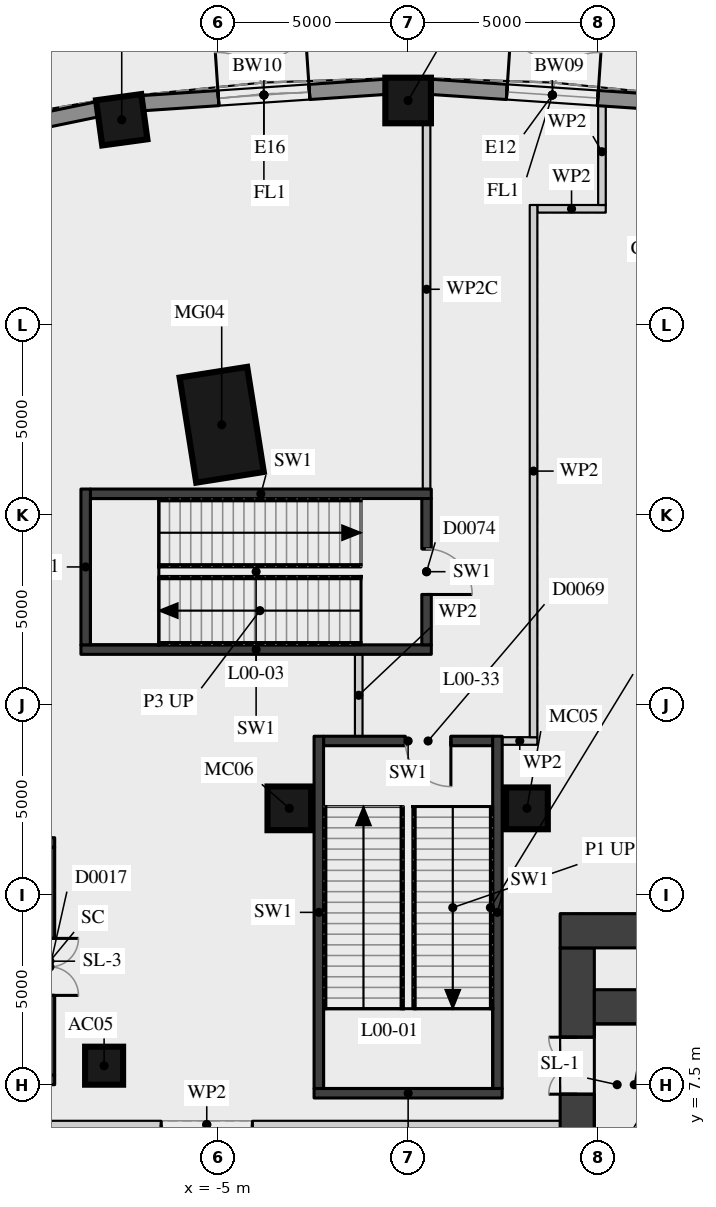
"""IFC4 building model, lengths in metres.
Left out: names, types, materials, properties, quantities, classifications, styles, units other than length and angle.
Written with IfcOpenShell. Run it as: python <this file> out.ifc"""

import sys

from ifc_helpers import new_model, si_unit, direction, frame, frame_2d, origin, origin_2d, place, context, subcontext, project, spatial, rectangle, extrude, element, fill, save


model = new_model("IFC4")
c1 = context("Model", 3, precision=1e-05, world=origin(), true_north=direction((0.0, 1.0)))
c2 = subcontext(c1, "Body", "Model", "MODEL_VIEW")
j1 = project(units=[si_unit("LENGTHUNIT", "METRE"), si_unit("PLANEANGLEUNIT", "RADIAN")], contexts=[c1])
p1 = place(None, origin())
s1 = spatial("IfcSite", under=j1, at=p1, CompositionType="ELEMENT")
p2 = place(p1, origin())
s2 = spatial("IfcBuilding", under=s1, at=p2, CompositionType="ELEMENT")
p3 = place(p2, origin())
s3 = spatial("IfcBuildingStorey", under=s2, at=p3, CompositionType="ELEMENT", Elevation=0.0)
p4 = place(p3, frame((-4.906, 24.866, 0.0), z_axis=(0.0, 0.0, 1.0), x_axis=(-0.15614709407, 0.987733812833, 0.0)))
e1 = element("IfcColumn", 1, at=p4, inside=s3, PredefinedType="COLUMN", context=c2, shape_type="SweptSolid", body=[
    extrude(rectangle(XDim=2.8, YDim=1.8, at=origin_2d()), origin(), (0.0, 0.0, 1.0), 7.5),
])
p5 = place(p3, frame((-8.0, 8.0, 0.0), z_axis=(0.0, 0.0, 1.0), x_axis=(1.0, 0.0, 0.0)))
e2 = element("IfcColumn", 2, at=p5, inside=s3, PredefinedType="COLUMN", context=c2, shape_type="SweptSolid", body=[
    extrude(rectangle(XDim=1.0, YDim=1.0, at=origin_2d()), origin(), (0.0, 0.0, 1.0), 7.5),
])
p6 = place(p3, frame((3.126, 14.772, 0.0), z_axis=(0.0, 0.0, 1.0), x_axis=(1.0, 0.0, 0.0)))
e3 = element("IfcColumn", 3, at=p6, inside=s3, PredefinedType="COLUMN", context=c2, shape_type="SweptSolid", body=[
    extrude(rectangle(XDim=1.1, YDim=1.1, at=origin_2d()), origin(), (0.0, 0.0, 1.0), 7.5),
])
p7 = place(p3, frame((-3.126, 14.772, 0.0), z_axis=(0.0, 0.0, 1.0), x_axis=(1.0, 0.0, 0.0)))
e4 = element("IfcColumn", 4, at=p7, inside=s3, PredefinedType="COLUMN", context=c2, shape_type="SweptSolid", body=[
    extrude(rectangle(XDim=1.15, YDim=1.15, at=origin_2d()), origin(), (0.0, 0.0, 1.0), 7.5),
])
for number, where, z_axis, x_axis in (
    (5, (0.0, 33.4, 0.0), (0.0, 0.0, 1.0), (0.0, 1.0, 0.0)),
    (6, (-7.536, 32.893, 0.0), (0.0, 0.0, 1.0), (-0.135, 0.991, 0.0)),
):
    element("IfcColumn", number, at=place(p3, frame(where, z_axis=z_axis, x_axis=x_axis)), inside=s3, PredefinedType="COLUMN", context=c2, shape_type="SweptSolid", body=[
        extrude(rectangle(XDim=1.2, YDim=1.2, at=origin_2d()), origin(), (0.0, 0.0, 1.0), 7.5),
    ])
p8 = place(p3, frame((7.02, 33.327, 0.0), z_axis=(0.0, 0.0, 1.0), x_axis=(-0.997740655275, 0.067183218234, 0.0)))
e7 = element("IfcWall", 7, at=p8, inside=s3, PredefinedType="SOLIDWALL", context=c2, shape_type="SweptSolid", body=[
    extrude(rectangle(XDim=6.465, YDim=0.4, at=frame_2d((3.232, 0.0))), origin(), (0.0, 0.0, 1.0), 6.19),
])
p9 = place(p8, frame((2.032, 0.0, 0.0)))
e8 = element("IfcOpeningElement", 8, at=p9, cuts=e7, PredefinedType="OPENING", context=c2, shape_type="SweptSolid", body=[
    extrude(rectangle(XDim=2.4, YDim=2.2, at=frame_2d((1.2, 1.1))), frame((0.0, 0.21, 0.0), z_axis=(0.0, -1.0, 0.0), x_axis=(1.0, 0.0, 0.0)), (0.0, 0.0, 1.0), 0.42),
])
p10 = place(p8, frame((2.032, 0.0, 2.6)))
e9 = element("IfcOpeningElement", 9, at=p10, cuts=e7, PredefinedType="OPENING", context=c2, shape_type="SweptSolid", body=[
    extrude(rectangle(XDim=2.4, YDim=3.49, at=frame_2d((1.2, 1.745))), frame((0.0, 0.21, 0.0), z_axis=(0.0, -1.0, 0.0), x_axis=(1.0, 0.0, 0.0)), (0.0, 0.0, 1.0), 0.42),
])
p11 = place(p3, frame((-0.57, 33.761, 0.0), z_axis=(0.0, 0.0, 1.0), x_axis=(-0.997740655275, -0.067183218234, 0.0)))
e10 = element("IfcWall", 10, at=p11, inside=s3, PredefinedType="SOLIDWALL", context=c2, shape_type="SweptSolid", body=[
    extrude(rectangle(XDim=6.465, YDim=0.4, at=frame_2d((3.232, 0.0))), origin(), (0.0, 0.0, 1.0), 6.19),
])
p12 = place(p11, frame((2.032, 0.0, 0.0)))
e11 = element("IfcOpeningElement", 11, at=p12, cuts=e10, PredefinedType="OPENING", context=c2, shape_type="SweptSolid", body=[
    extrude(rectangle(XDim=2.4, YDim=2.2, at=frame_2d((1.2, 1.1))), frame((0.0, 0.21, 0.0), z_axis=(0.0, -1.0, 0.0), x_axis=(1.0, 0.0, 0.0)), (0.0, 0.0, 1.0), 0.42),
])
p13 = place(p11, frame((2.032, 0.0, 2.6)))
e12 = element("IfcOpeningElement", 12, at=p13, cuts=e10, PredefinedType="OPENING", context=c2, shape_type="SweptSolid", body=[
    extrude(rectangle(XDim=2.4, YDim=3.49, at=frame_2d((1.2, 1.745))), frame((0.0, 0.21, 0.0), z_axis=(0.0, -1.0, 0.0), x_axis=(1.0, 0.0, 0.0)), (0.0, 0.0, 1.0), 0.42),
])
p14 = place(p3, frame((-8.15, 33.173, 0.0), z_axis=(0.0, 0.0, 1.0), x_axis=(-0.979388896242, -0.201983637746, 0.0)))
e13 = element("IfcWall", 13, at=p14, inside=s3, PredefinedType="SOLIDWALL", context=c2, shape_type="SweptSolid", body=[
    extrude(rectangle(XDim=6.374, YDim=0.4, at=frame_2d((3.187, 0.0))), origin(), (0.0, 0.0, 1.0), 6.19),
])
p15 = place(p14, frame((1.987, 0.0, 0.0)))
e14 = element("IfcOpeningElement", 14, at=p15, cuts=e13, PredefinedType="OPENING", context=c2, shape_type="SweptSolid", body=[
    extrude(rectangle(XDim=2.4, YDim=2.2, at=frame_2d((1.2, 1.1))), frame((0.0, 0.21, 0.0), z_axis=(0.0, -1.0, 0.0), x_axis=(1.0, 0.0, 0.0)), (0.0, 0.0, 1.0), 0.42),
])
p16 = place(p14, frame((1.987, 0.0, 2.6)))
e15 = element("IfcOpeningElement", 15, at=p16, cuts=e13, PredefinedType="OPENING", context=c2, shape_type="SweptSolid", body=[
    extrude(rectangle(XDim=2.4, YDim=3.49, at=frame_2d((1.2, 1.745))), frame((0.0, 0.21, 0.0), z_axis=(0.0, -1.0, 0.0), x_axis=(1.0, 0.0, 0.0)), (0.0, 0.0, 1.0), 0.42),
])
p17 = place(p3, frame((4.45, -11.1, 0.0), z_axis=(0.0, 0.0, 1.0), x_axis=(0.0, 1.0, 0.0)))
e16 = element("IfcWall", 16, at=p17, inside=s3, PredefinedType="SHEAR", context=c2, shape_type="SweptSolid", body=[
    extrude(rectangle(XDim=22.2, YDim=0.9, at=frame_2d((11.1, 0.0))), origin(), (0.0, 0.0, 1.0), 7.09),
])
p18 = place(p17, frame((2.35, 0.0, 0.0)))
e17 = element("IfcOpeningElement", 17, at=p18, cuts=e16, PredefinedType="OPENING", context=c2, shape_type="SweptSolid", body=[
    extrude(rectangle(XDim=1.5, YDim=2.1, at=frame_2d((0.75, 1.05))), frame((0.0, 0.46, 0.0), z_axis=(0.0, -1.0, 0.0), x_axis=(1.0, 0.0, 0.0)), (0.0, 0.0, 1.0), 0.92),
])
p19 = place(p17, frame((5.45, 0.0, 0.0)))
e18 = element("IfcOpeningElement", 18, at=p19, cuts=e16, PredefinedType="OPENING", context=c2, shape_type="SweptSolid", body=[
    extrude(rectangle(XDim=1.8, YDim=2.1, at=frame_2d((0.9, 1.05))), frame((0.0, 0.46, 0.0), z_axis=(0.0, -1.0, 0.0), x_axis=(1.0, 0.0, 0.0)), (0.0, 0.0, 1.0), 0.92),
])
p20 = place(p17, frame((7.95, 0.0, 0.0)))
e19 = element("IfcOpeningElement", 19, at=p20, cuts=e16, PredefinedType="OPENING", context=c2, shape_type="SweptSolid", body=[
    extrude(rectangle(XDim=1.1, YDim=2.1, at=frame_2d((0.55, 1.05))), frame((0.0, 0.46, 0.0), z_axis=(0.0, -1.0, 0.0), x_axis=(1.0, 0.0, 0.0)), (0.0, 0.0, 1.0), 0.92),
])
p21 = place(p17, frame((10.6, 0.0, 0.0)))
e20 = element("IfcOpeningElement", 20, at=p21, cuts=e16, PredefinedType="OPENING", context=c2, shape_type="SweptSolid", body=[
    extrude(rectangle(XDim=1.0, YDim=2.1, at=frame_2d((0.5, 1.05))), frame((0.0, 0.46, 0.0), z_axis=(0.0, -1.0, 0.0), x_axis=(1.0, 0.0, 0.0)), (0.0, 0.0, 1.0), 0.92),
])
p22 = place(p17, frame((13.15, 0.0, 0.0)))
e21 = element("IfcOpeningElement", 21, at=p22, cuts=e16, PredefinedType="OPENING", context=c2, shape_type="SweptSolid", body=[
    extrude(rectangle(XDim=1.1, YDim=2.1, at=frame_2d((0.55, 1.05))), frame((0.0, 0.46, 0.0), z_axis=(0.0, -1.0, 0.0), x_axis=(1.0, 0.0, 0.0)), (0.0, 0.0, 1.0), 0.92),
])
p23 = place(p17, frame((14.95, 0.0, 0.0)))
e22 = element("IfcOpeningElement", 22, at=p23, cuts=e16, PredefinedType="OPENING", context=c2, shape_type="SweptSolid", body=[
    extrude(rectangle(XDim=1.8, YDim=2.1, at=frame_2d((0.9, 1.05))), frame((0.0, 0.46, 0.0), z_axis=(0.0, -1.0, 0.0), x_axis=(1.0, 0.0, 0.0)), (0.0, 0.0, 1.0), 0.92),
])
p24 = place(p17, frame((18.35, 0.0, 0.0)))
e23 = element("IfcOpeningElement", 23, at=p24, cuts=e16, PredefinedType="OPENING", context=c2, shape_type="SweptSolid", body=[
    extrude(rectangle(XDim=1.5, YDim=2.1, at=frame_2d((0.75, 1.05))), frame((0.0, 0.46, 0.0), z_axis=(0.0, -1.0, 0.0), x_axis=(1.0, 0.0, 0.0)), (0.0, 0.0, 1.0), 0.92),
])
p25 = place(p3, frame((4.0, 11.55, 0.0), z_axis=(0.0, 0.0, 1.0), x_axis=(1.0, 0.0, 0.0)))
e24 = element("IfcWall", 24, at=p25, inside=s3, PredefinedType="SHEAR", context=c2, shape_type="SweptSolid", body=[
    extrude(rectangle(XDim=15.2, YDim=0.9, at=frame_2d((7.6, 0.0))), origin(), (0.0, 0.0, 1.0), 7.09),
])
p26 = place(p3, frame((4.9, 9.55, 0.0), z_axis=(0.0, 0.0, 1.0), x_axis=(1.0, 0.0, 0.0)))
e25 = element("IfcWall", 25, at=p26, inside=s3, PredefinedType="SHEAR", context=c2, shape_type="SweptSolid", body=[
    extrude(rectangle(XDim=10.2, YDim=0.9, at=frame_2d((5.1, 0.0))), origin(), (0.0, 0.0, 1.0), 7.09),
])
p27 = place(p3, frame((-9.425, 7.75, 0.0), z_axis=(0.0, 0.0, 1.0), x_axis=(0.0, 1.0, 0.0)))
e26 = element("IfcWall", 26, at=p27, inside=s3, PredefinedType="SHEAR", context=c2, shape_type="SweptSolid", body=[
    extrude(rectangle(XDim=6.0, YDim=0.25, at=frame_2d((3.0, 0.0))), origin(), (0.0, 0.0, 1.0), 7.09),
])
p28 = place(p27, frame((2.1, 0.0, 0.0)))
e27 = element("IfcOpeningElement", 27, at=p28, cuts=e26, PredefinedType="OPENING", context=c2, shape_type="SweptSolid", body=[
    extrude(rectangle(XDim=1.5, YDim=2.1, at=frame_2d((0.75, 1.05))), frame((0.0, 0.135, 0.0), z_axis=(0.0, -1.0, 0.0), x_axis=(1.0, 0.0, 0.0)), (0.0, 0.0, 1.0), 0.27),
])
for number, where, z_axis, x_axis in (
    (28, (-14.5, 13.875, 0.0), (0.0, 0.0, 1.0), (1.0, 0.0, 0.0)),
    (29, (-14.5, 7.625, 0.0), (0.0, 0.0, 1.0), (1.0, 0.0, 0.0)),
):
    element("IfcWall", number, at=place(p3, frame(where, z_axis=z_axis, x_axis=x_axis)), inside=s3, PredefinedType="SHEAR", context=c2, shape_type="SweptSolid", body=[
        extrude(rectangle(XDim=5.2, YDim=0.25, at=frame_2d((2.6, 0.0))), origin(), (0.0, 0.0, 1.0), 7.09),
    ])
p29 = place(p3, frame((-14.6, 6.45, 0.0), z_axis=(0.0, 0.0, 1.0), x_axis=(1.0, 0.0, 0.0)))
e30 = element("IfcWall", 30, at=p29, inside=s3, PredefinedType="PARTITIONING", context=c2, shape_type="SweptSolid", body=[
    extrude(rectangle(XDim=18.602, YDim=0.2, at=frame_2d((9.301, 0.0))), origin(), (0.0, 0.0, 1.0), 7.09),
])
p30 = place(p29, frame((8.101, 0.0, 0.0)))
e31 = element("IfcOpeningElement", 31, at=p30, cuts=e30, PredefinedType="OPENING", context=c2, shape_type="SweptSolid", body=[
    extrude(rectangle(XDim=2.4, YDim=2.4, at=frame_2d((1.2, 1.2))), frame((0.0, 0.11, 0.0), z_axis=(0.0, -1.0, 0.0), x_axis=(1.0, 0.0, 0.0)), (0.0, 0.0, 1.0), 0.22),
])
p31 = place(p3, frame((-2.475, 7.275, 0.0), z_axis=(0.0, 0.0, 1.0), x_axis=(1.0, 0.0, 0.0)))
e32 = element("IfcWall", 32, at=p31, inside=s3, PredefinedType="SOLIDWALL", context=c2, shape_type="SweptSolid", body=[
    extrude(rectangle(XDim=4.95, YDim=0.25, at=frame_2d((2.475, 0.0))), origin(), (0.0, 0.0, 1.0), 7.09),
])
p32 = place(p3, frame((-2.225, 16.545, 0.0), z_axis=(0.0, 0.0, 1.0), x_axis=(1.0, 0.0, 0.0)))
e33 = element("IfcWall", 33, at=p32, inside=s3, PredefinedType="SOLIDWALL", context=c2, shape_type="SweptSolid", body=[
    extrude(rectangle(XDim=4.45, YDim=0.25, at=frame_2d((2.225, 0.0))), origin(), (0.0, 0.0, 1.0), 7.09),
])
p33 = place(p32, frame((2.15, 0.0, 0.0)))
e34 = element("IfcOpeningElement", 34, at=p33, cuts=e33, PredefinedType="OPENING", context=c2, shape_type="SweptSolid", body=[
    extrude(rectangle(XDim=1.2, YDim=2.1, at=frame_2d((0.6, 1.05))), frame((0.0, 0.135, 0.0), z_axis=(0.0, -1.0, 0.0), x_axis=(1.0, 0.0, 0.0)), (0.0, 0.0, 1.0), 0.27),
])
p34 = place(p3, frame((2.475, 16.545, 0.0), z_axis=(0.0, 0.0, 1.0), x_axis=(1.0, 0.0, 0.0)))
e35 = element("IfcWall", 35, at=p34, inside=s3, PredefinedType="PARTITIONING", context=c2, shape_type="SweptSolid", body=[
    extrude(rectangle(XDim=0.925, YDim=0.2, at=frame_2d((0.462, 0.0))), origin(), (0.0, 0.0, 1.0), 7.09),
])
p35 = place(p3, frame((-8.61, 18.95, 0.0), z_axis=(0.0, 0.0, 1.0), x_axis=(1.0, 0.0, 0.0)))
e36 = element("IfcWall", 36, at=p35, inside=s3, PredefinedType="SOLIDWALL", context=c2, shape_type="SweptSolid", body=[
    extrude(rectangle(XDim=9.22, YDim=0.25, at=frame_2d((4.61, 0.0))), origin(), (0.0, 0.0, 1.0), 7.09),
])
p36 = place(p3, frame((-8.36, 23.05, 0.0), z_axis=(0.0, 0.0, 1.0), x_axis=(1.0, 0.0, 0.0)))
e37 = element("IfcWall", 37, at=p36, inside=s3, PredefinedType="SOLIDWALL", context=c2, shape_type="SweptSolid", body=[
    extrude(rectangle(XDim=8.97, YDim=0.25, at=frame_2d((4.485, 0.0))), origin(), (0.0, 0.0, 1.0), 7.09),
])
p37 = place(p3, frame((3.4, 30.55, 0.0), z_axis=(0.0, 0.0, 1.0), x_axis=(1.0, 0.0, 0.0)))
e38 = element("IfcWall", 38, at=p37, inside=s3, PredefinedType="PARTITIONING", context=c2, shape_type="SweptSolid", body=[
    extrude(rectangle(XDim=1.8, YDim=0.2, at=frame_2d((0.9, 0.0))), origin(), (0.0, 0.0, 1.0), 7.09),
])
p38 = place(p3, frame((-8.485, 19.075, 0.0), z_axis=(0.0, 0.0, 1.0), x_axis=(0.0, 1.0, 0.0)))
e39 = element("IfcWall", 39, at=p38, inside=s3, PredefinedType="SOLIDWALL", context=c2, shape_type="SweptSolid", body=[
    extrude(rectangle(XDim=4.1, YDim=0.25, at=frame_2d((2.05, 0.0))), origin(), (0.0, 0.0, 1.0), 7.09),
])
p39 = place(p3, frame((-2.35, 7.4, 0.0), z_axis=(0.0, 0.0, 1.0), x_axis=(0.0, 1.0, 0.0)))
e40 = element("IfcWall", 40, at=p39, inside=s3, PredefinedType="SOLIDWALL", context=c2, shape_type="SweptSolid", body=[
    extrude(rectangle(XDim=9.27, YDim=0.25, at=frame_2d((4.635, 0.0))), origin(), (0.0, 0.0, 1.0), 7.09),
])
p40 = place(p3, frame((-1.3, 16.67, 0.0), z_axis=(0.0, 0.0, 1.0), x_axis=(0.0, 1.0, 0.0)))
e41 = element("IfcWall", 41, at=p40, inside=s3, PredefinedType="PARTITIONING", context=c2, shape_type="SweptSolid", body=[
    extrude(rectangle(XDim=2.155, YDim=0.2, at=frame_2d((1.078, 0.0))), origin(), (0.0, 0.0, 1.0), 7.09),
])
p41 = place(p3, frame((0.485, 19.075, 0.0), z_axis=(0.0, 0.0, 1.0), x_axis=(0.0, 1.0, 0.0)))
e42 = element("IfcWall", 42, at=p41, inside=s3, PredefinedType="SOLIDWALL", context=c2, shape_type="SweptSolid", body=[
    extrude(rectangle(XDim=3.85, YDim=0.25, at=frame_2d((1.925, 0.0))), origin(), (0.0, 0.0, 1.0), 7.09),
])
p42 = place(p41, frame((1.325, 0.0, 0.0)))
e43 = element("IfcOpeningElement", 43, at=p42, cuts=e42, PredefinedType="OPENING", context=c2, shape_type="SweptSolid", body=[
    extrude(rectangle(XDim=1.2, YDim=2.1, at=frame_2d((0.6, 1.05))), frame((0.0, 0.135, 0.0), z_axis=(0.0, -1.0, 0.0), x_axis=(1.0, 0.0, 0.0)), (0.0, 0.0, 1.0), 0.27),
])
p43 = place(p3, frame((0.485, 23.175, 0.0), z_axis=(0.0, 0.0, 1.0), x_axis=(0.0, 1.0, 0.0)))
e44 = element("IfcWall", 44, at=p43, inside=s3, PredefinedType="PARTITIONING", context=c2, shape_type="SweptSolid", body=[
    extrude(rectangle(XDim=10.514, YDim=0.2, at=frame_2d((5.257, 0.0))), origin(), (0.0, 0.0, 1.0), 6.19),
])
p44 = place(p3, frame((2.35, 7.4, 0.0), z_axis=(0.0, 0.0, 1.0), x_axis=(0.0, 1.0, 0.0)))
e45 = element("IfcWall", 45, at=p44, inside=s3, PredefinedType="SOLIDWALL", context=c2, shape_type="SweptSolid", body=[
    extrude(rectangle(XDim=9.27, YDim=0.25, at=frame_2d((4.635, 0.0))), origin(), (0.0, 0.0, 1.0), 7.09),
])
p45 = place(p3, frame((3.3, 16.645, 0.0), z_axis=(0.0, 0.0, 1.0), x_axis=(0.0, 1.0, 0.0)))
e46 = element("IfcWall", 46, at=p45, inside=s3, PredefinedType="PARTITIONING", context=c2, shape_type="SweptSolid", body=[
    extrude(rectangle(XDim=14.005, YDim=0.2, at=frame_2d((7.002, 0.0))), origin(), (0.0, 0.0, 1.0), 7.09),
])
p46 = place(p3, frame((5.1, 30.65, 0.0), z_axis=(0.0, 0.0, 1.0), x_axis=(0.0, 1.0, 0.0)))
e47 = element("IfcWall", 47, at=p46, inside=s3, PredefinedType="PARTITIONING", context=c2, shape_type="SweptSolid", body=[
    extrude(rectangle(XDim=2.803, YDim=0.2, at=frame_2d((1.401, 0.0))), origin(), (0.0, 0.0, 1.0), 7.09),
])
p47 = place(p9, frame((2.4, 0.0, 0.0), z_axis=(0.0, 0.0, 1.0), x_axis=(-1.0, 0.0, 0.0)))
e48 = element("IfcDoor", 48, at=p47, inside=s3, OperationType="DOUBLE_DOOR_SINGLE_SWING", PredefinedType="DOOR", context=c2, shape_type="SweptSolid", body=[
    extrude(rectangle(XDim=2.4, YDim=2.2, at=frame_2d((1.2, 1.1))), frame((0.0, 0.05, 0.0), z_axis=(0.0, -1.0, 0.0), x_axis=(1.0, 0.0, 0.0)), (0.0, 0.0, 1.0), 0.05),
])
fill(e8, e48)
p48 = place(p10, origin())
e49 = element("IfcWindow", 49, at=p48, inside=s3, PartitioningType="SINGLE_PANEL", PredefinedType="WINDOW", context=c2, shape_type="SweptSolid", body=[
    extrude(rectangle(XDim=2.4, YDim=3.49, at=frame_2d((1.2, 1.745))), frame((0.0, 0.01, 0.0), z_axis=(0.0, -1.0, 0.0), x_axis=(1.0, 0.0, 0.0)), (0.0, 0.0, 1.0), 0.06),
])
fill(e9, e49)
p49 = place(p12, frame((2.4, 0.0, 0.0), z_axis=(0.0, 0.0, 1.0), x_axis=(-1.0, 0.0, 0.0)))
e50 = element("IfcDoor", 50, at=p49, inside=s3, OperationType="DOUBLE_DOOR_SINGLE_SWING", PredefinedType="DOOR", context=c2, shape_type="SweptSolid", body=[
    extrude(rectangle(XDim=2.4, YDim=2.2, at=frame_2d((1.2, 1.1))), frame((0.0, 0.05, 0.0), z_axis=(0.0, -1.0, 0.0), x_axis=(1.0, 0.0, 0.0)), (0.0, 0.0, 1.0), 0.05),
])
fill(e11, e50)
p50 = place(p13, origin())
e51 = element("IfcWindow", 51, at=p50, inside=s3, PartitioningType="SINGLE_PANEL", PredefinedType="WINDOW", context=c2, shape_type="SweptSolid", body=[
    extrude(rectangle(XDim=2.4, YDim=3.49, at=frame_2d((1.2, 1.745))), frame((0.0, 0.01, 0.0), z_axis=(0.0, -1.0, 0.0), x_axis=(1.0, 0.0, 0.0)), (0.0, 0.0, 1.0), 0.06),
])
fill(e12, e51)
p51 = place(p24, origin())
e52 = element("IfcDoor", 52, at=p51, inside=s3, OperationType="DOUBLE_DOOR_SINGLE_SWING", PredefinedType="DOOR", context=c2, shape_type="SweptSolid", body=[
    extrude(rectangle(XDim=1.5, YDim=2.1, at=frame_2d((0.75, 1.05))), frame((0.0, 0.025, 0.0), z_axis=(0.0, -1.0, 0.0), x_axis=(1.0, 0.0, 0.0)), (0.0, 0.0, 1.0), 0.05),
])
fill(e23, e52)
p52 = place(p30, origin())
e53 = element("IfcDoor", 53, at=p52, inside=s3, OperationType="DOUBLE_DOOR_SINGLE_SWING", PredefinedType="DOOR", context=c2, shape_type="SweptSolid", body=[
    extrude(rectangle(XDim=2.4, YDim=2.4, at=frame_2d((1.2, 1.2))), frame((0.0, 0.025, 0.0), z_axis=(0.0, -1.0, 0.0), x_axis=(1.0, 0.0, 0.0)), (0.0, 0.0, 1.0), 0.05),
])
fill(e31, e53)
p53 = place(p33, origin())
e54 = element("IfcDoor", 54, at=p53, inside=s3, OperationType="SINGLE_SWING_LEFT", PredefinedType="DOOR", context=c2, shape_type="SweptSolid", body=[
    extrude(rectangle(XDim=1.2, YDim=2.1, at=frame_2d((0.6, 1.05))), frame((0.0, 0.025, 0.0), z_axis=(0.0, -1.0, 0.0), x_axis=(1.0, 0.0, 0.0)), (0.0, 0.0, 1.0), 0.05),
])
fill(e34, e54)
p54 = place(p42, origin())
e55 = element("IfcDoor", 55, at=p54, inside=s3, OperationType="SINGLE_SWING_RIGHT", PredefinedType="DOOR", context=c2, shape_type="SweptSolid", body=[
    extrude(rectangle(XDim=1.2, YDim=2.1, at=frame_2d((0.6, 1.05))), frame((0.0, 0.025, 0.0), z_axis=(0.0, -1.0, 0.0), x_axis=(1.0, 0.0, 0.0)), (0.0, 0.0, 1.0), 0.05),
])
fill(e43, e55)
save(model, sys.argv[1])
